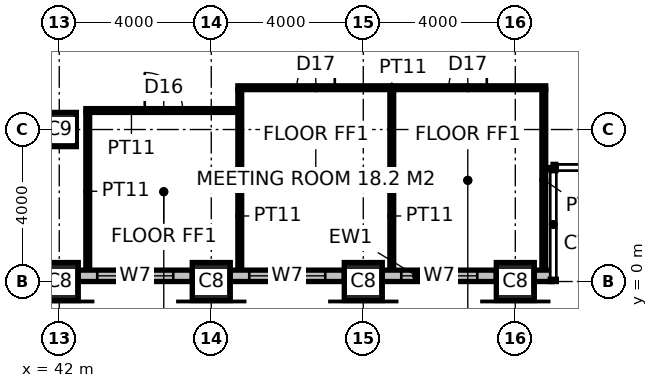
"""IFC4 building model, lengths in metres.
Left out: names, types, materials, properties, quantities, classifications, styles, units other than length and angle.
Written with IfcOpenShell. Run it as: python <this file> out.ifc"""

import sys

from ifc_helpers import new_model, si_unit, direction, frame, frame_2d, origin, origin_2d, place, context, subcontext, project, spatial, rectangle, hollow_rectangle, extrude, element, fill, save


model = new_model("IFC4")
c1 = context("Model", 3, precision=1e-05, world=origin(), true_north=direction((0.0, 1.0)))
c2 = subcontext(c1, "Body", "Model", "MODEL_VIEW")
j1 = project(units=[si_unit("LENGTHUNIT", "METRE"), si_unit("PLANEANGLEUNIT", "RADIAN")], contexts=[c1])
p1 = place(None, origin())
s1 = spatial("IfcSite", under=j1, at=p1, CompositionType="ELEMENT")
p2 = place(p1, origin())
s2 = spatial("IfcBuilding", under=s1, at=p2, CompositionType="ELEMENT")
p3 = place(p2, frame((0.0, 0.0, 101.4)))
s3 = spatial("IfcBuildingStorey", under=s2, at=p3, CompositionType="ELEMENT", Elevation=101.4)
for number, where, z_axis, x_axis in (
    (1, (42.0, 0.0, 0.0), (0.0, 0.0, 1.0), (1.0, 0.0, 0.0)),
    (2, (46.0, 0.0, 0.0), (0.0, 0.0, 1.0), (1.0, 0.0, 0.0)),
    (3, (50.0, 0.0, 0.0), (0.0, 0.0, 1.0), (1.0, 0.0, 0.0)),
    (4, (54.0, 0.0, 0.0), (0.0, 0.0, 1.0), (1.0, 0.0, 0.0)),
):
    element("IfcColumn", number, at=place(p3, frame(where, z_axis=z_axis, x_axis=x_axis)), inside=s3, PredefinedType="COLUMN", context=c2, shape_type="SweptSolid", body=[
        extrude(hollow_rectangle(XDim=1.0, YDim=1.0, WallThickness=0.125, at=origin_2d()), origin(), (0.0, 0.0, 1.0), 4.0),
    ])
p4 = place(p3, frame((42.0, 4.0, 0.0), z_axis=(0.0, 0.0, 1.0), x_axis=(1.0, 0.0, 0.0)))
e5 = element("IfcColumn", 5, at=p4, inside=s3, PredefinedType="COLUMN", context=c2, shape_type="SweptSolid", body=[
    extrude(hollow_rectangle(XDim=0.9, YDim=0.9, WallThickness=0.125, at=origin_2d()), origin(), (0.0, 0.0, 1.0), 4.0),
])
p5 = place(p3, frame((42.7, 4.5, 0.0), z_axis=(0.0, 0.0, 1.0), x_axis=(1.0, 0.0, 0.0)))
e6 = element("IfcWall", 6, at=p5, inside=s3, PredefinedType="PARTITIONING", context=c2, shape_type="SweptSolid", body=[
    extrude(rectangle(XDim=4.0, YDim=0.1, at=frame_2d((2.0, 0.0))), origin(), (0.0, 0.0, 1.0), 3.85),
])
p6 = place(p5, frame((1.55, 0.0, 0.0)))
e7 = element("IfcOpeningElement", 7, at=p6, cuts=e6, PredefinedType="OPENING", context=c2, shape_type="SweptSolid", body=[
    extrude(rectangle(XDim=1.0, YDim=2.2, at=frame_2d((0.5, 1.1))), frame((0.0, 0.06, 0.0), z_axis=(0.0, -1.0, 0.0), x_axis=(1.0, 0.0, 0.0)), (0.0, 0.0, 1.0), 0.12),
])
p7 = place(p3, frame((46.7, 5.1, 0.0), z_axis=(0.0, 0.0, 1.0), x_axis=(1.0, 0.0, 0.0)))
e8 = element("IfcWall", 8, at=p7, inside=s3, PredefinedType="PARTITIONING", context=c2, shape_type="SweptSolid", body=[
    extrude(rectangle(XDim=8.1, YDim=0.1, at=frame_2d((4.05, 0.0))), origin(), (0.0, 0.0, 1.0), 3.85),
])
p8 = place(p7, frame((1.55, 0.0, 0.0)))
e9 = element("IfcOpeningElement", 9, at=p8, cuts=e8, PredefinedType="OPENING", context=c2, shape_type="SweptSolid", body=[
    extrude(rectangle(XDim=1.0, YDim=2.2, at=frame_2d((0.5, 1.1))), frame((0.0, 0.06, 0.0), z_axis=(0.0, -1.0, 0.0), x_axis=(1.0, 0.0, 0.0)), (0.0, 0.0, 1.0), 0.12),
])
p9 = place(p7, frame((5.55, 0.0, 0.0)))
e10 = element("IfcOpeningElement", 10, at=p9, cuts=e8, PredefinedType="OPENING", context=c2, shape_type="SweptSolid", body=[
    extrude(rectangle(XDim=1.0, YDim=2.2, at=frame_2d((0.5, 1.1))), frame((0.0, 0.06, 0.0), z_axis=(0.0, -1.0, 0.0), x_axis=(1.0, 0.0, 0.0)), (0.0, 0.0, 1.0), 0.12),
])
p10 = place(p3, frame((42.75, 0.3, 0.0), z_axis=(0.0, 0.0, 1.0), x_axis=(0.0, 1.0, 0.0)))
e11 = element("IfcWall", 11, at=p10, inside=s3, PredefinedType="PARTITIONING", context=c2, shape_type="SweptSolid", body=[
    extrude(rectangle(XDim=4.15, YDim=0.1, at=frame_2d((2.075, 0.0))), origin(), (0.0, 0.0, 1.0), 3.85),
])
for number, where, z_axis, x_axis in (
    (12, (46.75, 0.3, 0.0), (0.0, 0.0, 1.0), (0.0, 1.0, 0.0)),
    (13, (50.75, 0.3, 0.0), (0.0, 0.0, 1.0), (0.0, 1.0, 0.0)),
    (14, (54.75, 0.3, 0.0), (0.0, 0.0, 1.0), (0.0, 1.0, 0.0)),
):
    element("IfcWall", number, at=place(p3, frame(where, z_axis=z_axis, x_axis=x_axis)), inside=s3, PredefinedType="PARTITIONING", context=c2, shape_type="SweptSolid", body=[
        extrude(rectangle(XDim=4.75, YDim=0.1, at=frame_2d((2.375, 0.0))), origin(), (0.0, 0.0, 1.0), 3.85),
    ])
p11 = place(p3, frame((42.5, 0.15, 0.0), z_axis=(0.0, 0.0, 1.0), x_axis=(1.0, 0.0, 0.0)))
e15 = element("IfcWall", 15, at=p11, inside=s3, PredefinedType="ELEMENTEDWALL", context=c2, shape_type="SweptSolid", body=[
    extrude(rectangle(XDim=3.0, YDim=0.3, at=frame_2d((1.5, 0.0))), origin(), (0.0, 0.0, 1.0), 2.65),
])
p12 = place(p11, frame((0.5, 0.0, 0.8)))
e16 = element("IfcOpeningElement", 16, at=p12, cuts=e15, PredefinedType="OPENING", context=c2, shape_type="SweptSolid", body=[
    extrude(rectangle(XDim=2.0, YDim=1.8, at=frame_2d((1.0, 0.9))), frame((0.0, 0.16, 0.0), z_axis=(0.0, -1.0, 0.0), x_axis=(1.0, 0.0, 0.0)), (0.0, 0.0, 1.0), 0.32),
])
p13 = place(p3, frame((46.5, 0.15, 0.0), z_axis=(0.0, 0.0, 1.0), x_axis=(1.0, 0.0, 0.0)))
e17 = element("IfcWall", 17, at=p13, inside=s3, PredefinedType="ELEMENTEDWALL", context=c2, shape_type="SweptSolid", body=[
    extrude(rectangle(XDim=3.0, YDim=0.3, at=frame_2d((1.5, 0.0))), origin(), (0.0, 0.0, 1.0), 2.65),
])
p14 = place(p13, frame((0.5, 0.0, 0.8)))
e18 = element("IfcOpeningElement", 18, at=p14, cuts=e17, PredefinedType="OPENING", context=c2, shape_type="SweptSolid", body=[
    extrude(rectangle(XDim=2.0, YDim=1.8, at=frame_2d((1.0, 0.9))), frame((0.0, 0.16, 0.0), z_axis=(0.0, -1.0, 0.0), x_axis=(1.0, 0.0, 0.0)), (0.0, 0.0, 1.0), 0.32),
])
p15 = place(p3, frame((50.5, 0.15, 0.0), z_axis=(0.0, 0.0, 1.0), x_axis=(1.0, 0.0, 0.0)))
e19 = element("IfcWall", 19, at=p15, inside=s3, PredefinedType="ELEMENTEDWALL", context=c2, shape_type="SweptSolid", body=[
    extrude(rectangle(XDim=3.0, YDim=0.3, at=frame_2d((1.5, 0.0))), origin(), (0.0, 0.0, 1.0), 2.65),
])
p16 = place(p15, frame((0.5, 0.0, 0.8)))
e20 = element("IfcOpeningElement", 20, at=p16, cuts=e19, PredefinedType="OPENING", context=c2, shape_type="SweptSolid", body=[
    extrude(rectangle(XDim=2.0, YDim=1.8, at=frame_2d((1.0, 0.9))), frame((0.0, 0.16, 0.0), z_axis=(0.0, -1.0, 0.0), x_axis=(1.0, 0.0, 0.0)), (0.0, 0.0, 1.0), 0.32),
])
p17 = place(p3, frame((54.5, 0.15, 0.0), z_axis=(0.0, 0.0, 1.0), x_axis=(1.0, 0.0, 0.0)))
e21 = element("IfcWall", 21, at=p17, inside=s3, PredefinedType="ELEMENTEDWALL", context=c2, shape_type="SweptSolid", body=[
    extrude(rectangle(XDim=0.47, YDim=0.3, at=frame_2d((0.235, 0.0))), origin(), (0.0, 0.0, 1.0), 2.65),
])
p18 = place(p6, origin())
e22 = element("IfcDoor", 22, at=p18, inside=s3, OperationType="SINGLE_SWING_LEFT", PredefinedType="DOOR", context=c2, shape_type="SweptSolid", body=[
    extrude(rectangle(XDim=1.0, YDim=2.2, at=frame_2d((0.5, 1.1))), frame((0.0, 0.025, 0.0), z_axis=(0.0, -1.0, 0.0), x_axis=(1.0, 0.0, 0.0)), (0.0, 0.0, 1.0), 0.05),
])
fill(e7, e22)
p19 = place(p8, origin())
e23 = element("IfcDoor", 23, at=p19, inside=s3, OperationType="SINGLE_SWING_RIGHT", PredefinedType="DOOR", context=c2, shape_type="SweptSolid", body=[
    extrude(rectangle(XDim=1.0, YDim=2.2, at=frame_2d((0.5, 1.1))), frame((0.0, 0.025, 0.0), z_axis=(0.0, -1.0, 0.0), x_axis=(1.0, 0.0, 0.0)), (0.0, 0.0, 1.0), 0.05),
])
fill(e9, e23)
p20 = place(p9, origin())
e24 = element("IfcDoor", 24, at=p20, inside=s3, OperationType="SINGLE_SWING_RIGHT", PredefinedType="DOOR", context=c2, shape_type="SweptSolid", body=[
    extrude(rectangle(XDim=1.0, YDim=2.2, at=frame_2d((0.5, 1.1))), frame((0.0, 0.025, 0.0), z_axis=(0.0, -1.0, 0.0), x_axis=(1.0, 0.0, 0.0)), (0.0, 0.0, 1.0), 0.05),
])
fill(e10, e24)
p21 = place(p12, origin())
e25 = element("IfcWindow", 25, at=p21, inside=s3, PartitioningType="SINGLE_PANEL", PredefinedType="WINDOW", context=c2, shape_type="SweptSolid", body=[
    extrude(rectangle(XDim=2.0, YDim=1.8, at=frame_2d((1.0, 0.9))), frame((0.0, 0.03, 0.0), z_axis=(0.0, -1.0, 0.0), x_axis=(1.0, 0.0, 0.0)), (0.0, 0.0, 1.0), 0.06),
])
fill(e16, e25)
p22 = place(p14, origin())
e26 = element("IfcWindow", 26, at=p22, inside=s3, PartitioningType="SINGLE_PANEL", PredefinedType="WINDOW", context=c2, shape_type="SweptSolid", body=[
    extrude(rectangle(XDim=2.0, YDim=1.8, at=frame_2d((1.0, 0.9))), frame((0.0, 0.03, 0.0), z_axis=(0.0, -1.0, 0.0), x_axis=(1.0, 0.0, 0.0)), (0.0, 0.0, 1.0), 0.06),
])
fill(e18, e26)
p23 = place(p16, origin())
e27 = element("IfcWindow", 27, at=p23, inside=s3, PartitioningType="SINGLE_PANEL", PredefinedType="WINDOW", context=c2, shape_type="SweptSolid", body=[
    extrude(rectangle(XDim=2.0, YDim=1.8, at=frame_2d((1.0, 0.9))), frame((0.0, 0.03, 0.0), z_axis=(0.0, -1.0, 0.0), x_axis=(1.0, 0.0, 0.0)), (0.0, 0.0, 1.0), 0.06),
])
fill(e20, e27)
save(model, sys.argv[1])
